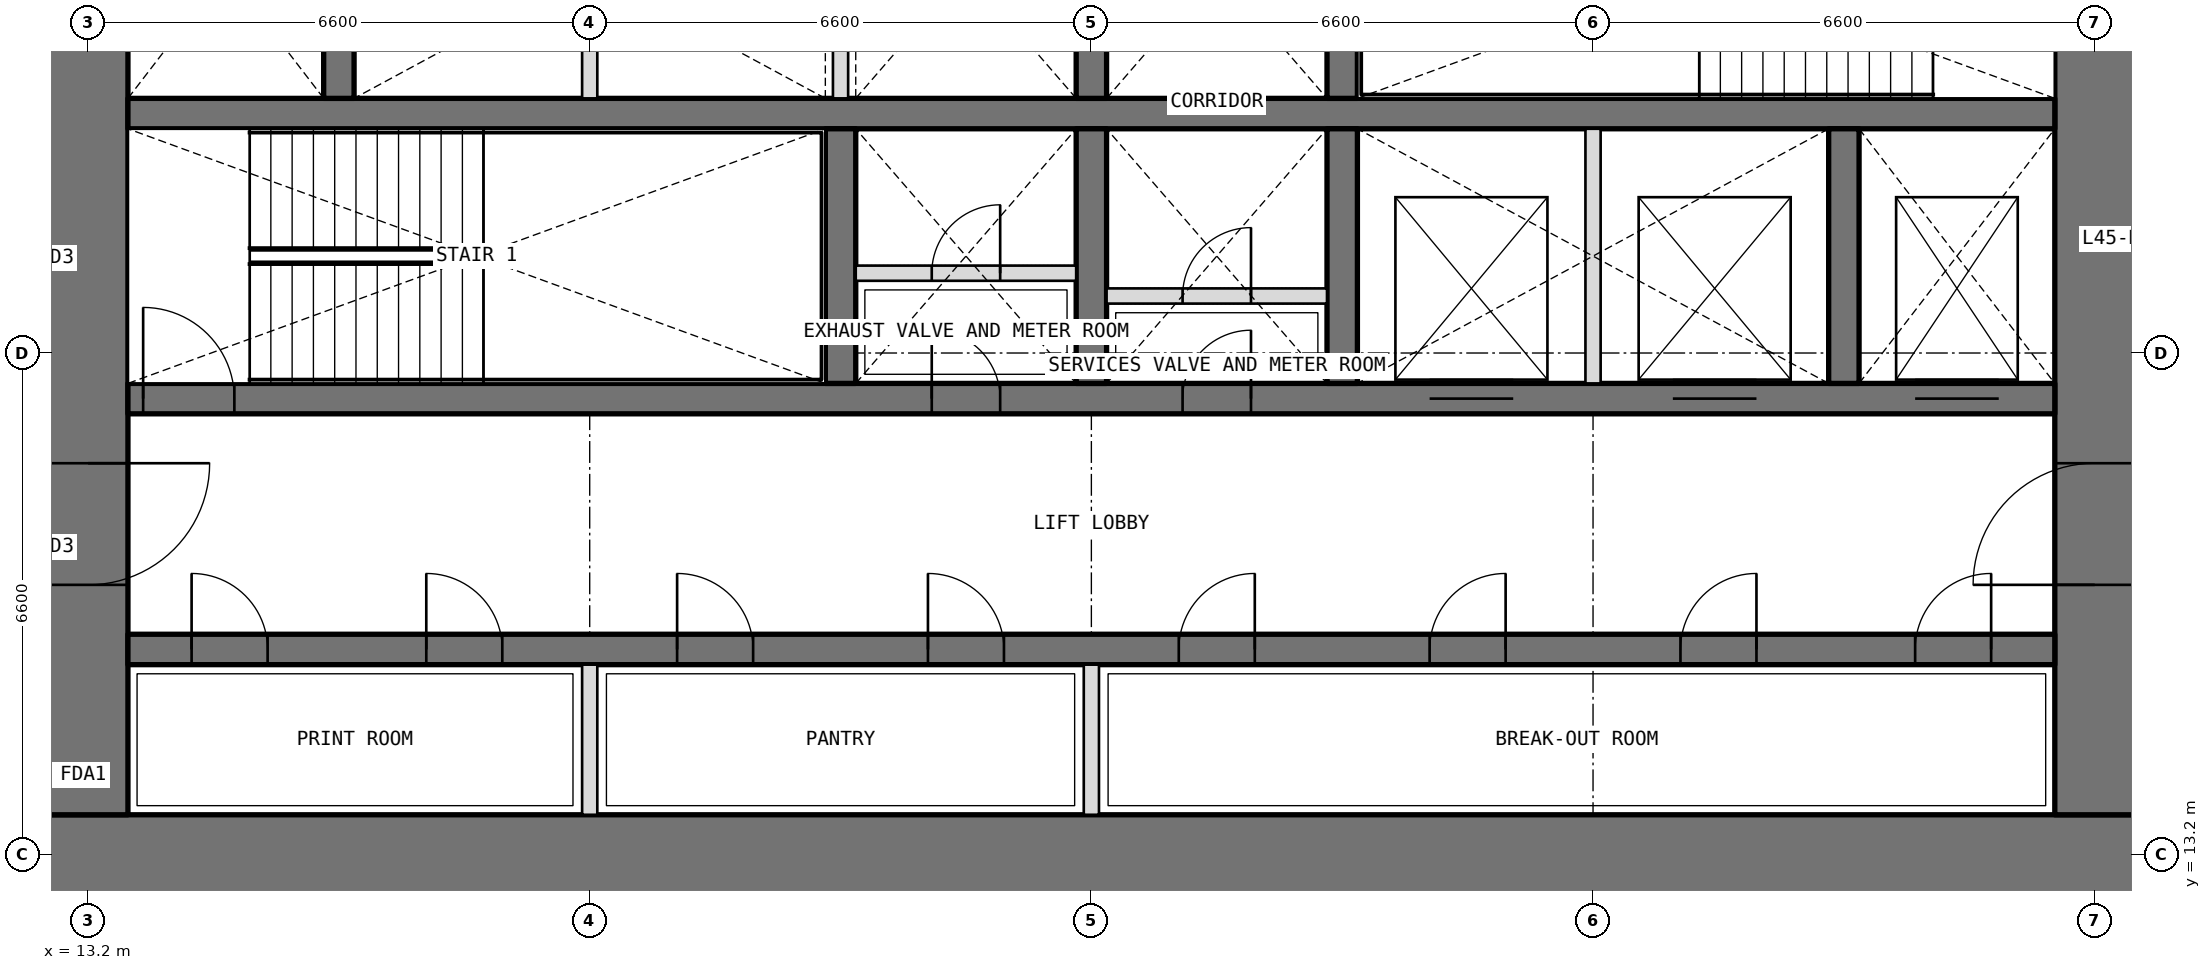
"""IFC4 building model, lengths in metres.
Left out: names, types, materials, properties, quantities, classifications, styles, units other than length and angle.
Written with IfcOpenShell. Run it as: python <this file> out.ifc"""

import sys

from ifc_helpers import new_model, si_unit, direction, frame, frame_2d, origin, place, context, subcontext, project, spatial, rectangle, extrude, element, fill, save


model = new_model("IFC4")
c1 = context("Model", 3, precision=1e-05, world=origin(), true_north=direction((0.0, 1.0)))
c2 = subcontext(c1, "Body", "Model", "MODEL_VIEW")
j1 = project(units=[si_unit("LENGTHUNIT", "METRE"), si_unit("PLANEANGLEUNIT", "RADIAN")], contexts=[c1])
p1 = place(None, origin())
s1 = spatial("IfcSite", under=j1, at=p1, CompositionType="ELEMENT")
p2 = place(p1, origin())
s2 = spatial("IfcBuilding", under=s1, at=p2, CompositionType="ELEMENT")
p3 = place(p2, frame((0.0, 0.0, 197.7)))
s3 = spatial("IfcBuildingStorey", under=s2, at=p3, CompositionType="ELEMENT", Elevation=197.7)
p4 = place(p3, frame((12.675, 13.2, 0.0), z_axis=(0.0, 0.0, 1.0), x_axis=(1.0, 0.0, 0.0)))
e1 = element("IfcWall", 1, at=p4, inside=s3, PredefinedType="SHEAR", context=c2, shape_type="SweptSolid", body=[
    extrude(rectangle(XDim=27.45, YDim=1.05, at=frame_2d((13.725, 0.0))), origin(), (0.0, 0.0, 1.0), 4.2),
])
p5 = place(p3, frame((39.6, 13.725, 0.0), z_axis=(0.0, 0.0, 1.0), x_axis=(0.0, 1.0, 0.0)))
e2 = element("IfcWall", 2, at=p5, inside=s3, PredefinedType="SHEAR", context=c2, shape_type="SweptSolid", body=[
    extrude(rectangle(XDim=18.75, YDim=1.05, at=frame_2d((9.375, 0.0))), origin(), (0.0, 0.0, 1.0), 4.2),
])
p6 = place(p5, frame((3.025, 0.0, 0.0)))
e3 = element("IfcOpeningElement", 3, at=p6, cuts=e2, PredefinedType="OPENING", context=c2, shape_type="SweptSolid", body=[
    extrude(rectangle(XDim=1.6, YDim=2.1, at=frame_2d((0.8, 1.05))), frame((0.0, 0.535, 0.0), z_axis=(0.0, -1.0, 0.0), x_axis=(1.0, 0.0, 0.0)), (0.0, 0.0, 1.0), 1.07),
])
p7 = place(p5, frame((13.825, 0.0, 0.0)))
e4 = element("IfcOpeningElement", 4, at=p7, cuts=e2, PredefinedType="OPENING", context=c2, shape_type="SweptSolid", body=[
    extrude(rectangle(XDim=1.6, YDim=2.1, at=frame_2d((0.8, 1.05))), frame((0.0, 0.535, 0.0), z_axis=(0.0, -1.0, 0.0), x_axis=(1.0, 0.0, 0.0)), (0.0, 0.0, 1.0), 1.07),
])
p8 = place(p3, frame((13.2, 32.475, 0.0), z_axis=(0.0, 0.0, 1.0), x_axis=(0.0, -1.0, 0.0)))
e5 = element("IfcWall", 5, at=p8, inside=s3, PredefinedType="SHEAR", context=c2, shape_type="SweptSolid", body=[
    extrude(rectangle(XDim=18.75, YDim=1.05, at=frame_2d((9.375, 0.0))), origin(), (0.0, 0.0, 1.0), 4.2),
])
p9 = place(p8, frame((14.125, 0.0, 0.0)))
e6 = element("IfcOpeningElement", 6, at=p9, cuts=e5, PredefinedType="OPENING", context=c2, shape_type="SweptSolid", body=[
    extrude(rectangle(XDim=1.6, YDim=2.1, at=frame_2d((0.8, 1.05))), frame((0.0, 0.535, 0.0), z_axis=(0.0, -1.0, 0.0), x_axis=(1.0, 0.0, 0.0)), (0.0, 0.0, 1.0), 1.07),
])
p10 = place(p8, frame((3.325, 0.0, 0.0)))
e7 = element("IfcOpeningElement", 7, at=p10, cuts=e5, PredefinedType="OPENING", context=c2, shape_type="SweptSolid", body=[
    extrude(rectangle(XDim=1.6, YDim=2.1, at=frame_2d((0.8, 1.05))), frame((0.0, 0.535, 0.0), z_axis=(0.0, -1.0, 0.0), x_axis=(1.0, 0.0, 0.0)), (0.0, 0.0, 1.0), 1.07),
])
p11 = place(p3, frame((13.725, 15.9, 0.0), z_axis=(0.0, 0.0, 1.0), x_axis=(1.0, 0.0, 0.0)))
e8 = element("IfcWall", 8, at=p11, inside=s3, PredefinedType="SHEAR", context=c2, shape_type="SweptSolid", body=[
    extrude(rectangle(XDim=25.35, YDim=0.4, at=frame_2d((12.675, 0.0))), origin(), (0.0, 0.0, 1.0), 4.2),
])
p12 = place(p11, frame((0.837, 0.0, 0.0)))
e9 = element("IfcOpeningElement", 9, at=p12, cuts=e8, PredefinedType="OPENING", context=c2, shape_type="SweptSolid", body=[
    extrude(rectangle(XDim=1.0, YDim=2.1, at=frame_2d((0.5, 1.05))), frame((0.0, 0.21, 0.0), z_axis=(0.0, -1.0, 0.0), x_axis=(1.0, 0.0, 0.0)), (0.0, 0.0, 1.0), 0.42),
])
p13 = place(p11, frame((3.925, 0.0, 0.0)))
e10 = element("IfcOpeningElement", 10, at=p13, cuts=e8, PredefinedType="OPENING", context=c2, shape_type="SweptSolid", body=[
    extrude(rectangle(XDim=1.0, YDim=2.1, at=frame_2d((0.5, 1.05))), frame((0.0, 0.21, 0.0), z_axis=(0.0, -1.0, 0.0), x_axis=(1.0, 0.0, 0.0)), (0.0, 0.0, 1.0), 0.42),
])
p14 = place(p11, frame((7.225, 0.0, 0.0)))
e11 = element("IfcOpeningElement", 11, at=p14, cuts=e8, PredefinedType="OPENING", context=c2, shape_type="SweptSolid", body=[
    extrude(rectangle(XDim=1.0, YDim=2.1, at=frame_2d((0.5, 1.05))), frame((0.0, 0.21, 0.0), z_axis=(0.0, -1.0, 0.0), x_axis=(1.0, 0.0, 0.0)), (0.0, 0.0, 1.0), 0.42),
])
p15 = place(p11, frame((10.525, 0.0, 0.0)))
e12 = element("IfcOpeningElement", 12, at=p15, cuts=e8, PredefinedType="OPENING", context=c2, shape_type="SweptSolid", body=[
    extrude(rectangle(XDim=1.0, YDim=2.1, at=frame_2d((0.5, 1.05))), frame((0.0, 0.21, 0.0), z_axis=(0.0, -1.0, 0.0), x_axis=(1.0, 0.0, 0.0)), (0.0, 0.0, 1.0), 0.42),
])
p16 = place(p11, frame((13.825, 0.0, 0.0)))
e13 = element("IfcOpeningElement", 13, at=p16, cuts=e8, PredefinedType="OPENING", context=c2, shape_type="SweptSolid", body=[
    extrude(rectangle(XDim=1.0, YDim=2.1, at=frame_2d((0.5, 1.05))), frame((0.0, 0.21, 0.0), z_axis=(0.0, -1.0, 0.0), x_axis=(1.0, 0.0, 0.0)), (0.0, 0.0, 1.0), 0.42),
])
p17 = place(p11, frame((17.125, 0.0, 0.0)))
e14 = element("IfcOpeningElement", 14, at=p17, cuts=e8, PredefinedType="OPENING", context=c2, shape_type="SweptSolid", body=[
    extrude(rectangle(XDim=1.0, YDim=2.1, at=frame_2d((0.5, 1.05))), frame((0.0, 0.21, 0.0), z_axis=(0.0, -1.0, 0.0), x_axis=(1.0, 0.0, 0.0)), (0.0, 0.0, 1.0), 0.42),
])
p18 = place(p11, frame((20.425, 0.0, 0.0)))
e15 = element("IfcOpeningElement", 15, at=p18, cuts=e8, PredefinedType="OPENING", context=c2, shape_type="SweptSolid", body=[
    extrude(rectangle(XDim=1.0, YDim=2.1, at=frame_2d((0.5, 1.05))), frame((0.0, 0.21, 0.0), z_axis=(0.0, -1.0, 0.0), x_axis=(1.0, 0.0, 0.0)), (0.0, 0.0, 1.0), 0.42),
])
p19 = place(p11, frame((23.512, 0.0, 0.0)))
e16 = element("IfcOpeningElement", 16, at=p19, cuts=e8, PredefinedType="OPENING", context=c2, shape_type="SweptSolid", body=[
    extrude(rectangle(XDim=1.0, YDim=2.1, at=frame_2d((0.5, 1.05))), frame((0.0, 0.21, 0.0), z_axis=(0.0, -1.0, 0.0), x_axis=(1.0, 0.0, 0.0)), (0.0, 0.0, 1.0), 0.42),
])
p20 = place(p3, frame((13.725, 19.2, 0.0), z_axis=(0.0, 0.0, 1.0), x_axis=(1.0, 0.0, 0.0)))
e17 = element("IfcWall", 17, at=p20, inside=s3, PredefinedType="SHEAR", context=c2, shape_type="SweptSolid", body=[
    extrude(rectangle(XDim=25.35, YDim=0.4, at=frame_2d((12.675, 0.0))), origin(), (0.0, 0.0, 1.0), 4.2),
])
p21 = place(p20, frame((10.575, 0.0, 0.0)))
e18 = element("IfcOpeningElement", 18, at=p21, cuts=e17, PredefinedType="OPENING", context=c2, shape_type="SweptSolid", body=[
    extrude(rectangle(XDim=0.9, YDim=2.1, at=frame_2d((0.45, 1.05))), frame((0.0, 0.21, 0.0), z_axis=(0.0, -1.0, 0.0), x_axis=(1.0, 0.0, 0.0)), (0.0, 0.0, 1.0), 0.42),
])
p22 = place(p20, frame((13.875, 0.0, 0.0)))
e19 = element("IfcOpeningElement", 19, at=p22, cuts=e17, PredefinedType="OPENING", context=c2, shape_type="SweptSolid", body=[
    extrude(rectangle(XDim=0.9, YDim=2.1, at=frame_2d((0.45, 1.05))), frame((0.0, 0.21, 0.0), z_axis=(0.0, -1.0, 0.0), x_axis=(1.0, 0.0, 0.0)), (0.0, 0.0, 1.0), 0.42),
])
p23 = place(p20, frame((0.2, 0.0, 0.0)))
e20 = element("IfcOpeningElement", 20, at=p23, cuts=e17, PredefinedType="OPENING", context=c2, shape_type="SweptSolid", body=[
    extrude(rectangle(XDim=1.2, YDim=2.1, at=frame_2d((0.6, 1.05))), frame((0.0, 0.21, 0.0), z_axis=(0.0, -1.0, 0.0), x_axis=(1.0, 0.0, 0.0)), (0.0, 0.0, 1.0), 0.42),
])
p24 = place(p20, frame((23.512, 0.0, 0.0)))
e21 = element("IfcOpeningElement", 21, at=p24, cuts=e17, PredefinedType="OPENING", context=c2, shape_type="SweptSolid", body=[
    extrude(rectangle(XDim=1.1, YDim=2.1, at=frame_2d((0.55, 1.05))), frame((0.0, 0.21, 0.0), z_axis=(0.0, -1.0, 0.0), x_axis=(1.0, 0.0, 0.0)), (0.0, 0.0, 1.0), 0.42),
])
p25 = place(p20, frame((17.125, 0.0, 0.0)))
e22 = element("IfcOpeningElement", 22, at=p25, cuts=e17, PredefinedType="OPENING", context=c2, shape_type="SweptSolid", body=[
    extrude(rectangle(XDim=1.1, YDim=2.1, at=frame_2d((0.55, 1.05))), frame((0.0, 0.21, 0.0), z_axis=(0.0, -1.0, 0.0), x_axis=(1.0, 0.0, 0.0)), (0.0, 0.0, 1.0), 0.42),
])
p26 = place(p20, frame((20.325, 0.0, 0.0)))
e23 = element("IfcOpeningElement", 23, at=p26, cuts=e17, PredefinedType="OPENING", context=c2, shape_type="SweptSolid", body=[
    extrude(rectangle(XDim=1.1, YDim=2.1, at=frame_2d((0.55, 1.05))), frame((0.0, 0.21, 0.0), z_axis=(0.0, -1.0, 0.0), x_axis=(1.0, 0.0, 0.0)), (0.0, 0.0, 1.0), 0.42),
])
p27 = place(p3, frame((13.725, 22.95, 0.0), z_axis=(0.0, 0.0, 1.0), x_axis=(1.0, 0.0, 0.0)))
e24 = element("IfcWall", 24, at=p27, inside=s3, PredefinedType="SHEAR", context=c2, shape_type="SweptSolid", body=[
    extrude(rectangle(XDim=25.35, YDim=0.4, at=frame_2d((12.675, 0.0))), origin(), (0.0, 0.0, 1.0), 4.2),
])
for number, where, z_axis, x_axis in (
    (25, (23.1, 19.4, 0.0), (0.0, 0.0, 1.0), (0.0, 1.0, 0.0)),
    (26, (26.4, 19.4, 0.0), (0.0, 0.0, 1.0), (0.0, 1.0, 0.0)),
    (27, (29.7, 19.4, 0.0), (0.0, 0.0, 1.0), (0.0, 1.0, 0.0)),
    (28, (36.3, 19.4, 0.0), (0.0, 0.0, 1.0), (0.0, 1.0, 0.0)),
    (29, (16.5, 23.15, 0.0), (0.0, 0.0, 1.0), (0.0, 1.0, 0.0)),
    (30, (26.4, 23.15, 0.0), (0.0, 0.0, 1.0), (0.0, 1.0, 0.0)),
    (31, (29.7, 23.15, 0.0), (0.0, 0.0, 1.0), (0.0, 1.0, 0.0)),
):
    element("IfcWall", number, at=place(p3, frame(where, z_axis=z_axis, x_axis=x_axis)), inside=s3, PredefinedType="SHEAR", context=c2, shape_type="SweptSolid", body=[
        extrude(rectangle(XDim=3.35, YDim=0.4, at=frame_2d((1.675, 0.0))), origin(), (0.0, 0.0, 1.0), 4.2),
    ])
for number, where, z_axis, x_axis in (
    (32, (19.8, 13.725, 0.0), (0.0, 0.0, 1.0), (0.0, 1.0, 0.0)),
    (33, (26.4, 13.725, 0.0), (0.0, 0.0, 1.0), (0.0, 1.0, 0.0)),
):
    element("IfcWall", number, at=place(p3, frame(where, z_axis=z_axis, x_axis=x_axis)), inside=s3, PredefinedType="PARTITIONING", context=c2, shape_type="SweptSolid", body=[
        extrude(rectangle(XDim=1.975, YDim=0.2, at=frame_2d((0.987, 0.0))), origin(), (0.0, 0.0, 1.0), 4.2),
    ])
for number, where, z_axis, x_axis in (
    (34, (33.0, 19.4, 0.0), (0.0, 0.0, 1.0), (0.0, 1.0, 0.0)),
    (35, (19.8, 23.15, 0.0), (0.0, 0.0, 1.0), (0.0, 1.0, 0.0)),
    (36, (23.1, 23.15, 0.0), (0.0, 0.0, 1.0), (0.0, 1.0, 0.0)),
):
    element("IfcWall", number, at=place(p3, frame(where, z_axis=z_axis, x_axis=x_axis)), inside=s3, PredefinedType="PARTITIONING", context=c2, shape_type="SweptSolid", body=[
        extrude(rectangle(XDim=3.35, YDim=0.2, at=frame_2d((1.675, 0.0))), origin(), (0.0, 0.0, 1.0), 4.2),
    ])
p28 = place(p3, frame((23.3, 20.85, 0.0), z_axis=(0.0, 0.0, 1.0), x_axis=(1.0, 0.0, 0.0)))
e37 = element("IfcWall", 37, at=p28, inside=s3, PredefinedType="PARTITIONING", context=c2, shape_type="SweptSolid", body=[
    extrude(rectangle(XDim=2.9, YDim=0.2, at=frame_2d((1.45, 0.0))), origin(), (0.0, 0.0, 1.0), 3.9),
])
p29 = place(p28, frame((1.0, 0.0, 0.0)))
e38 = element("IfcOpeningElement", 38, at=p29, cuts=e37, PredefinedType="OPENING", context=c2, shape_type="SweptSolid", body=[
    extrude(rectangle(XDim=0.9, YDim=2.1, at=frame_2d((0.45, 1.05))), frame((0.0, 0.11, 0.0), z_axis=(0.0, -1.0, 0.0), x_axis=(1.0, 0.0, 0.0)), (0.0, 0.0, 1.0), 0.22),
])
p30 = place(p3, frame((26.6, 20.55, 0.0), z_axis=(0.0, 0.0, 1.0), x_axis=(1.0, 0.0, 0.0)))
e39 = element("IfcWall", 39, at=p30, inside=s3, PredefinedType="PARTITIONING", context=c2, shape_type="SweptSolid", body=[
    extrude(rectangle(XDim=2.9, YDim=0.2, at=frame_2d((1.45, 0.0))), origin(), (0.0, 0.0, 1.0), 3.9),
])
p31 = place(p30, frame((1.0, 0.0, 0.0)))
e40 = element("IfcOpeningElement", 40, at=p31, cuts=e39, PredefinedType="OPENING", context=c2, shape_type="SweptSolid", body=[
    extrude(rectangle(XDim=0.9, YDim=2.1, at=frame_2d((0.45, 1.05))), frame((0.0, 0.11, 0.0), z_axis=(0.0, -1.0, 0.0), x_axis=(1.0, 0.0, 0.0)), (0.0, 0.0, 1.0), 0.22),
])
p32 = place(p21, origin())
e41 = element("IfcDoor", 41, at=p32, inside=s3, OperationType="SINGLE_SWING_LEFT", PredefinedType="DOOR", context=c2, shape_type="SweptSolid", body=[
    extrude(rectangle(XDim=0.9, YDim=2.1, at=frame_2d((0.45, 1.05))), frame((0.0, 0.025, 0.0), z_axis=(0.0, -1.0, 0.0), x_axis=(1.0, 0.0, 0.0)), (0.0, 0.0, 1.0), 0.05),
])
fill(e18, e41)
p33 = place(p29, origin())
e42 = element("IfcDoor", 42, at=p33, inside=s3, OperationType="SINGLE_SWING_RIGHT", PredefinedType="DOOR", context=c2, shape_type="SweptSolid", body=[
    extrude(rectangle(XDim=0.9, YDim=2.1, at=frame_2d((0.45, 1.05))), frame((0.0, 0.025, 0.0), z_axis=(0.0, -1.0, 0.0), x_axis=(1.0, 0.0, 0.0)), (0.0, 0.0, 1.0), 0.05),
])
fill(e38, e42)
p34 = place(p22, origin())
e43 = element("IfcDoor", 43, at=p34, inside=s3, OperationType="SINGLE_SWING_RIGHT", PredefinedType="DOOR", context=c2, shape_type="SweptSolid", body=[
    extrude(rectangle(XDim=0.9, YDim=2.1, at=frame_2d((0.45, 1.05))), frame((0.0, 0.025, 0.0), z_axis=(0.0, -1.0, 0.0), x_axis=(1.0, 0.0, 0.0)), (0.0, 0.0, 1.0), 0.05),
])
fill(e19, e43)
p35 = place(p31, origin())
e44 = element("IfcDoor", 44, at=p35, inside=s3, OperationType="SINGLE_SWING_RIGHT", PredefinedType="DOOR", context=c2, shape_type="SweptSolid", body=[
    extrude(rectangle(XDim=0.9, YDim=2.1, at=frame_2d((0.45, 1.05))), frame((0.0, 0.025, 0.0), z_axis=(0.0, -1.0, 0.0), x_axis=(1.0, 0.0, 0.0)), (0.0, 0.0, 1.0), 0.05),
])
fill(e40, e44)
p36 = place(p12, origin())
e45 = element("IfcDoor", 45, at=p36, inside=s3, OperationType="SINGLE_SWING_LEFT", PredefinedType="DOOR", context=c2, shape_type="SweptSolid", body=[
    extrude(rectangle(XDim=1.0, YDim=2.1, at=frame_2d((0.5, 1.05))), frame((0.0, 0.025, 0.0), z_axis=(0.0, -1.0, 0.0), x_axis=(1.0, 0.0, 0.0)), (0.0, 0.0, 1.0), 0.05),
])
fill(e9, e45)
p37 = place(p13, origin())
e46 = element("IfcDoor", 46, at=p37, inside=s3, OperationType="SINGLE_SWING_LEFT", PredefinedType="DOOR", context=c2, shape_type="SweptSolid", body=[
    extrude(rectangle(XDim=1.0, YDim=2.1, at=frame_2d((0.5, 1.05))), frame((0.0, 0.025, 0.0), z_axis=(0.0, -1.0, 0.0), x_axis=(1.0, 0.0, 0.0)), (0.0, 0.0, 1.0), 0.05),
])
fill(e10, e46)
p38 = place(p14, origin())
e47 = element("IfcDoor", 47, at=p38, inside=s3, OperationType="SINGLE_SWING_LEFT", PredefinedType="DOOR", context=c2, shape_type="SweptSolid", body=[
    extrude(rectangle(XDim=1.0, YDim=2.1, at=frame_2d((0.5, 1.05))), frame((0.0, 0.025, 0.0), z_axis=(0.0, -1.0, 0.0), x_axis=(1.0, 0.0, 0.0)), (0.0, 0.0, 1.0), 0.05),
])
fill(e11, e47)
p39 = place(p15, origin())
e48 = element("IfcDoor", 48, at=p39, inside=s3, OperationType="SINGLE_SWING_LEFT", PredefinedType="DOOR", context=c2, shape_type="SweptSolid", body=[
    extrude(rectangle(XDim=1.0, YDim=2.1, at=frame_2d((0.5, 1.05))), frame((0.0, 0.025, 0.0), z_axis=(0.0, -1.0, 0.0), x_axis=(1.0, 0.0, 0.0)), (0.0, 0.0, 1.0), 0.05),
])
fill(e12, e48)
p40 = place(p16, origin())
e49 = element("IfcDoor", 49, at=p40, inside=s3, OperationType="SINGLE_SWING_RIGHT", PredefinedType="DOOR", context=c2, shape_type="SweptSolid", body=[
    extrude(rectangle(XDim=1.0, YDim=2.1, at=frame_2d((0.5, 1.05))), frame((0.0, 0.025, 0.0), z_axis=(0.0, -1.0, 0.0), x_axis=(1.0, 0.0, 0.0)), (0.0, 0.0, 1.0), 0.05),
])
fill(e13, e49)
p41 = place(p17, origin())
e50 = element("IfcDoor", 50, at=p41, inside=s3, OperationType="SINGLE_SWING_RIGHT", PredefinedType="DOOR", context=c2, shape_type="SweptSolid", body=[
    extrude(rectangle(XDim=1.0, YDim=2.1, at=frame_2d((0.5, 1.05))), frame((0.0, 0.025, 0.0), z_axis=(0.0, -1.0, 0.0), x_axis=(1.0, 0.0, 0.0)), (0.0, 0.0, 1.0), 0.05),
])
fill(e14, e50)
p42 = place(p18, origin())
e51 = element("IfcDoor", 51, at=p42, inside=s3, OperationType="SINGLE_SWING_RIGHT", PredefinedType="DOOR", context=c2, shape_type="SweptSolid", body=[
    extrude(rectangle(XDim=1.0, YDim=2.1, at=frame_2d((0.5, 1.05))), frame((0.0, 0.025, 0.0), z_axis=(0.0, -1.0, 0.0), x_axis=(1.0, 0.0, 0.0)), (0.0, 0.0, 1.0), 0.05),
])
fill(e15, e51)
p43 = place(p19, origin())
e52 = element("IfcDoor", 52, at=p43, inside=s3, OperationType="SINGLE_SWING_RIGHT", PredefinedType="DOOR", context=c2, shape_type="SweptSolid", body=[
    extrude(rectangle(XDim=1.0, YDim=2.1, at=frame_2d((0.5, 1.05))), frame((0.0, 0.025, 0.0), z_axis=(0.0, -1.0, 0.0), x_axis=(1.0, 0.0, 0.0)), (0.0, 0.0, 1.0), 0.05),
])
fill(e16, e52)
p44 = place(p23, origin())
e53 = element("IfcDoor", 53, at=p44, inside=s3, OperationType="SINGLE_SWING_LEFT", PredefinedType="DOOR", context=c2, shape_type="SweptSolid", body=[
    extrude(rectangle(XDim=1.2, YDim=2.1, at=frame_2d((0.6, 1.05))), frame((0.0, 0.025, 0.0), z_axis=(0.0, -1.0, 0.0), x_axis=(1.0, 0.0, 0.0)), (0.0, 0.0, 1.0), 0.05),
])
fill(e20, e53)
p45 = place(p9, origin())
e54 = element("IfcDoor", 54, at=p45, inside=s3, OperationType="DOUBLE_DOOR_DOUBLE_SWING", PredefinedType="DOOR", context=c2, shape_type="SweptSolid", body=[
    extrude(rectangle(XDim=1.6, YDim=2.1, at=frame_2d((0.8, 1.05))), frame((0.0, 0.025, 0.0), z_axis=(0.0, -1.0, 0.0), x_axis=(1.0, 0.0, 0.0)), (0.0, 0.0, 1.0), 0.05),
])
fill(e6, e54)
p46 = place(p6, origin())
e55 = element("IfcDoor", 55, at=p46, inside=s3, OperationType="DOUBLE_DOOR_DOUBLE_SWING", PredefinedType="DOOR", context=c2, shape_type="SweptSolid", body=[
    extrude(rectangle(XDim=1.6, YDim=2.1, at=frame_2d((0.8, 1.05))), frame((0.0, 0.025, 0.0), z_axis=(0.0, -1.0, 0.0), x_axis=(1.0, 0.0, 0.0)), (0.0, 0.0, 1.0), 0.05),
])
fill(e3, e55)
p47 = place(p24, origin())
e56 = element("IfcDoor", 56, at=p47, inside=s3, OperationType="DOUBLE_DOOR_SLIDING", PredefinedType="DOOR", context=c2, shape_type="SweptSolid", body=[
    extrude(rectangle(XDim=1.1, YDim=2.1, at=frame_2d((0.55, 1.05))), frame((0.0, 0.025, 0.0), z_axis=(0.0, -1.0, 0.0), x_axis=(1.0, 0.0, 0.0)), (0.0, 0.0, 1.0), 0.05),
])
fill(e21, e56)
p48 = place(p25, origin())
e57 = element("IfcDoor", 57, at=p48, inside=s3, OperationType="DOUBLE_DOOR_SLIDING", PredefinedType="DOOR", context=c2, shape_type="SweptSolid", body=[
    extrude(rectangle(XDim=1.1, YDim=2.1, at=frame_2d((0.55, 1.05))), frame((0.0, 0.025, 0.0), z_axis=(0.0, -1.0, 0.0), x_axis=(1.0, 0.0, 0.0)), (0.0, 0.0, 1.0), 0.05),
])
fill(e22, e57)
p49 = place(p26, origin())
e58 = element("IfcDoor", 58, at=p49, inside=s3, OperationType="DOUBLE_DOOR_SLIDING", PredefinedType="DOOR", context=c2, shape_type="SweptSolid", body=[
    extrude(rectangle(XDim=1.1, YDim=2.1, at=frame_2d((0.55, 1.05))), frame((0.0, 0.025, 0.0), z_axis=(0.0, -1.0, 0.0), x_axis=(1.0, 0.0, 0.0)), (0.0, 0.0, 1.0), 0.05),
])
fill(e23, e58)
save(model, sys.argv[1])
